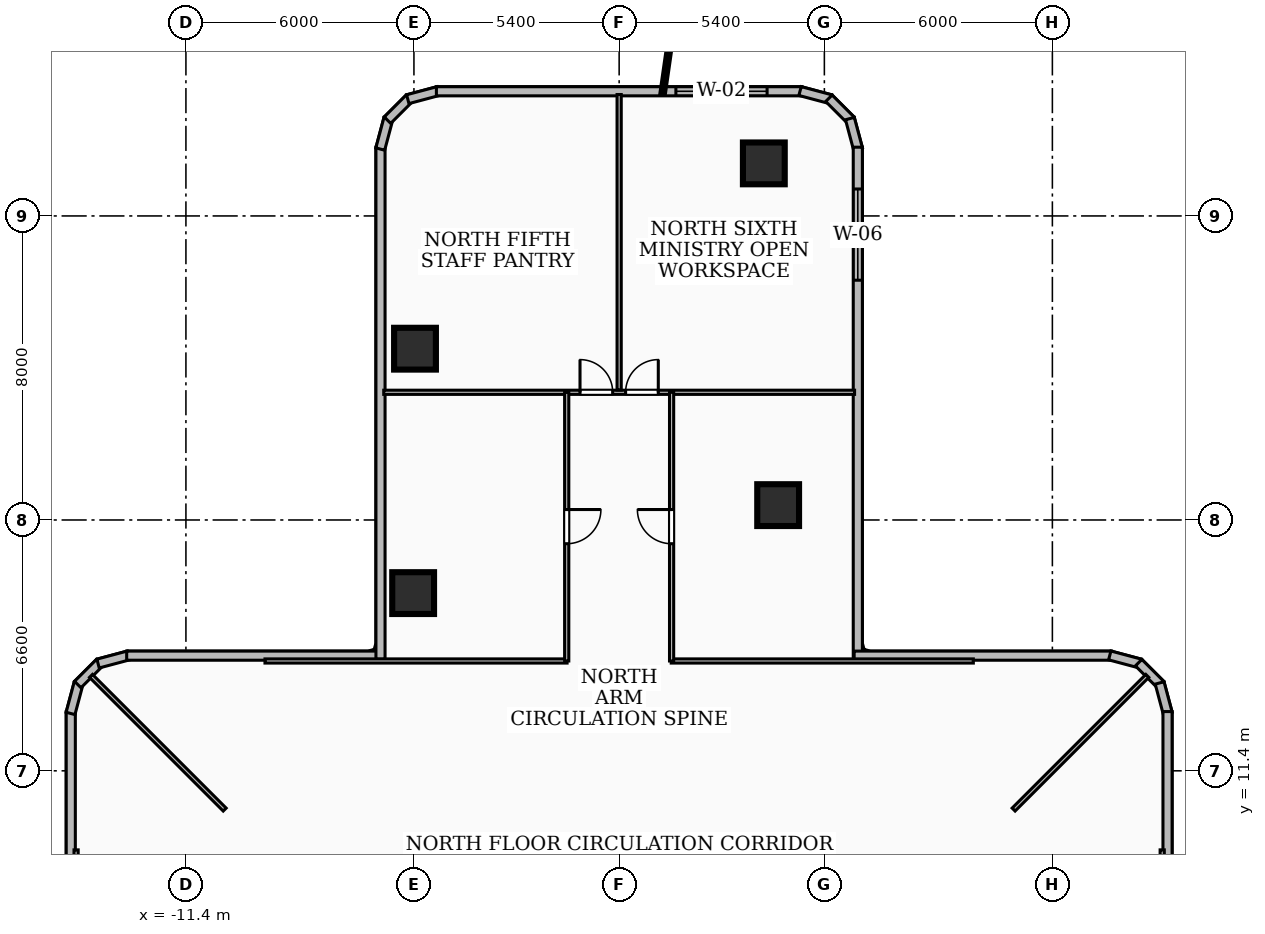
"""IFC4 building model, lengths in metres.
Left out: names, types, materials, properties, quantities, classifications, styles, units other than length and angle.
Written with IfcOpenShell. Run it as: python <this file> out.ifc"""

import sys

from ifc_helpers import new_model, si_unit, direction, frame, frame_2d, origin, origin_2d, place, context, subcontext, project, spatial, rectangle, extrude, element, fill, save


model = new_model("IFC4")
c1 = context("Model", 3, precision=1e-05, world=origin(), true_north=direction((0.0, 1.0)))
c2 = subcontext(c1, "Body", "Model", "MODEL_VIEW")
j1 = project(units=[si_unit("LENGTHUNIT", "METRE"), si_unit("PLANEANGLEUNIT", "RADIAN")], contexts=[c1])
p1 = place(None, origin())
s1 = spatial("IfcSite", under=j1, at=p1, CompositionType="ELEMENT")
p2 = place(p1, origin())
s2 = spatial("IfcBuilding", under=s1, at=p2, CompositionType="ELEMENT")
p3 = place(p2, frame((0.0, 0.0, 28.08)))
s3 = spatial("IfcBuildingStorey", under=s2, at=p3, CompositionType="ELEMENT", Elevation=28.08)
for number, where, z_axis, x_axis in (
    (1, (4.184, 18.391, 0.0), (0.0, 0.0, 1.0), (1.0, 0.0, 0.0)),
    (2, (-5.421, 16.076, 0.0), (0.0, 0.0, 1.0), (1.0, 0.0, 0.0)),
    (3, (3.807, 27.383, 0.0), (0.0, 0.0, 1.0), (1.0, 0.0, 0.0)),
    (4, (-5.372, 22.507, 0.0), (0.0, 0.0, 1.0), (1.0, 0.0, 0.0)),
):
    element("IfcColumn", number, at=place(p3, frame(where, z_axis=z_axis, x_axis=x_axis)), inside=s3, PredefinedType="COLUMN", context=c2, shape_type="SweptSolid", body=[
        extrude(rectangle(XDim=1.1, YDim=1.1, at=origin_2d()), origin(), (0.0, 0.0, 1.0), 3.6),
    ])
p4 = place(p3, frame((-14.43, 6.184, 0.0), z_axis=(0.0, 0.0, 1.0), x_axis=(0.0, 1.0, 0.0)))
e5 = element("IfcWall", 5, at=p4, inside=s3, PredefinedType="SOLIDWALL", context=c2, shape_type="SweptSolid", body=[
    extrude(rectangle(XDim=6.775, YDim=0.24, at=frame_2d((3.387, 0.0))), origin(), (0.0, 0.0, 1.0), 3.34),
])
p5 = place(p3, frame((-14.436, 12.91, 0.0), z_axis=(0.0, 0.0, 1.0), x_axis=(0.257937227116, 0.966161677396, 0.0)))
e6 = element("IfcWall", 6, at=p5, inside=s3, PredefinedType="SOLIDWALL", context=c2, shape_type="SweptSolid", body=[
    extrude(rectangle(XDim=0.83, YDim=0.24, at=frame_2d((0.415, 0.0))), origin(), (0.0, 0.0, 1.0), 3.34),
])
p6 = place(p3, frame((-14.246, 13.67, 0.0), z_axis=(0.0, 0.0, 1.0), x_axis=(0.707106781187, 0.707106781187, 0.0)))
e7 = element("IfcWall", 7, at=p6, inside=s3, PredefinedType="SOLIDWALL", context=c2, shape_type="SweptSolid", body=[
    extrude(rectangle(XDim=0.815, YDim=0.24, at=frame_2d((0.407, 0.0))), origin(), (0.0, 0.0, 1.0), 3.34),
])
p7 = place(p3, frame((-13.712, 14.222, 0.0), z_axis=(0.0, 0.0, 1.0), x_axis=(0.966161677396, 0.257937227116, 0.0)))
e8 = element("IfcWall", 8, at=p7, inside=s3, PredefinedType="SOLIDWALL", context=c2, shape_type="SweptSolid", body=[
    extrude(rectangle(XDim=0.83, YDim=0.24, at=frame_2d((0.415, 0.0))), origin(), (0.0, 0.0, 1.0), 3.34),
])
p8 = place(p3, frame((-12.959, 14.43, 0.0), z_axis=(0.0, 0.0, 1.0), x_axis=(1.0, 0.0, 0.0)))
e9 = element("IfcWall", 9, at=p8, inside=s3, PredefinedType="SOLIDWALL", context=c2, shape_type="SweptSolid", body=[
    extrude(rectangle(XDim=6.775, YDim=0.24, at=frame_2d((3.387, 0.0))), origin(), (0.0, 0.0, 1.0), 2.421),
])
p9 = place(p3, frame((-6.28, 14.334, 0.0), z_axis=(0.0, 0.0, 1.0), x_axis=(0.0, 1.0, 0.0)))
e10 = element("IfcWall", 10, at=p9, inside=s3, PredefinedType="SOLIDWALL", context=c2, shape_type="SweptSolid", body=[
    extrude(rectangle(XDim=13.475, YDim=0.24, at=frame_2d((6.738, 0.0))), origin(), (0.0, 0.0, 1.0), 2.421),
])
p10 = place(p3, frame((-6.286, 27.76, 0.0), z_axis=(0.0, 0.0, 1.0), x_axis=(0.25766265056, 0.966234939601, 0.0)))
e11 = element("IfcWall", 11, at=p10, inside=s3, PredefinedType="SOLIDWALL", context=c2, shape_type="SweptSolid", body=[
    extrude(rectangle(XDim=0.83, YDim=0.24, at=frame_2d((0.415, 0.0))), origin(), (0.0, 0.0, 1.0), 3.34),
])
p11 = place(p3, frame((-6.096, 28.52, 0.0), z_axis=(0.0, 0.0, 1.0), x_axis=(0.707106781187, 0.707106781187, 0.0)))
e12 = element("IfcWall", 12, at=p11, inside=s3, PredefinedType="SOLIDWALL", context=c2, shape_type="SweptSolid", body=[
    extrude(rectangle(XDim=0.814, YDim=0.24, at=frame_2d((0.407, 0.0))), origin(), (0.0, 0.0, 1.0), 3.34),
])
p12 = place(p3, frame((-5.562, 29.072, 0.0), z_axis=(0.0, 0.0, 1.0), x_axis=(0.966234939601, 0.25766265056, 0.0)))
e13 = element("IfcWall", 13, at=p12, inside=s3, PredefinedType="SOLIDWALL", context=c2, shape_type="SweptSolid", body=[
    extrude(rectangle(XDim=0.83, YDim=0.24, at=frame_2d((0.415, 0.0))), origin(), (0.0, 0.0, 1.0), 3.34),
])
p13 = place(p3, frame((-4.809, 29.28, 0.0), z_axis=(0.0, 0.0, 1.0), x_axis=(1.0, 0.0, 0.0)))
e14 = element("IfcWall", 14, at=p13, inside=s3, PredefinedType="SOLIDWALL", context=c2, shape_type="SweptSolid", body=[
    extrude(rectangle(XDim=9.618, YDim=0.24, at=frame_2d((4.809, 0.0))), origin(), (0.0, 0.0, 1.0), 3.34),
])
p14 = place(p13, frame((6.302, 0.0, 0.85)))
e15 = element("IfcOpeningElement", 15, at=p14, cuts=e14, PredefinedType="OPENING", context=c2, shape_type="SweptSolid", body=[
    extrude(rectangle(XDim=2.4, YDim=2.1, at=frame_2d((1.2, 1.05))), frame((0.0, 0.13, 0.0), z_axis=(0.0, -1.0, 0.0), x_axis=(1.0, 0.0, 0.0)), (0.0, 0.0, 1.0), 0.26),
])
p15 = place(p3, frame((4.76, 29.286, 0.0), z_axis=(0.0, 0.0, 1.0), x_axis=(0.966234939601, -0.25766265056, 0.0)))
e16 = element("IfcWall", 16, at=p15, inside=s3, PredefinedType="SOLIDWALL", context=c2, shape_type="SweptSolid", body=[
    extrude(rectangle(XDim=0.83, YDim=0.24, at=frame_2d((0.415, 0.0))), origin(), (0.0, 0.0, 1.0), 3.34),
])
p16 = place(p3, frame((5.52, 29.096, 0.0), z_axis=(0.0, 0.0, 1.0), x_axis=(0.707106781187, -0.707106781187, 0.0)))
e17 = element("IfcWall", 17, at=p16, inside=s3, PredefinedType="SOLIDWALL", context=c2, shape_type="SweptSolid", body=[
    extrude(rectangle(XDim=0.814, YDim=0.24, at=frame_2d((0.407, 0.0))), origin(), (0.0, 0.0, 1.0), 3.34),
])
p17 = place(p3, frame((6.072, 28.562, 0.0), z_axis=(0.0, 0.0, 1.0), x_axis=(0.25766265056, -0.966234939601, 0.0)))
e18 = element("IfcWall", 18, at=p17, inside=s3, PredefinedType="SOLIDWALL", context=c2, shape_type="SweptSolid", body=[
    extrude(rectangle(XDim=0.83, YDim=0.24, at=frame_2d((0.415, 0.0))), origin(), (0.0, 0.0, 1.0), 3.34),
])
p18 = place(p3, frame((6.28, 27.809, 0.0), z_axis=(0.0, 0.0, 1.0), x_axis=(0.0, -1.0, 0.0)))
e19 = element("IfcWall", 19, at=p18, inside=s3, PredefinedType="SOLIDWALL", context=c2, shape_type="SweptSolid", body=[
    extrude(rectangle(XDim=13.475, YDim=0.24, at=frame_2d((6.738, 0.0))), origin(), (0.0, 0.0, 1.0), 3.34),
])
p19 = place(p18, frame((1.1, 0.0, 0.85)))
e20 = element("IfcOpeningElement", 20, at=p19, cuts=e19, PredefinedType="OPENING", context=c2, shape_type="SweptSolid", body=[
    extrude(rectangle(XDim=2.4, YDim=1.85, at=frame_2d((1.2, 0.925))), frame((0.0, 0.13, 0.0), z_axis=(0.0, -1.0, 0.0), x_axis=(1.0, 0.0, 0.0)), (0.0, 0.0, 1.0), 0.26),
])
p20 = place(p3, frame((6.184, 14.43, 0.0), z_axis=(0.0, 0.0, 1.0), x_axis=(1.0, 0.0, 0.0)))
e21 = element("IfcWall", 21, at=p20, inside=s3, PredefinedType="SOLIDWALL", context=c2, shape_type="SweptSolid", body=[
    extrude(rectangle(XDim=6.775, YDim=0.24, at=frame_2d((3.387, 0.0))), origin(), (0.0, 0.0, 1.0), 3.34),
])
p21 = place(p3, frame((12.91, 14.436, 0.0), z_axis=(0.0, 0.0, 1.0), x_axis=(0.966161677396, -0.257937227116, 0.0)))
e22 = element("IfcWall", 22, at=p21, inside=s3, PredefinedType="SOLIDWALL", context=c2, shape_type="SweptSolid", body=[
    extrude(rectangle(XDim=0.83, YDim=0.24, at=frame_2d((0.415, 0.0))), origin(), (0.0, 0.0, 1.0), 3.34),
])
p22 = place(p3, frame((13.67, 14.246, 0.0), z_axis=(0.0, 0.0, 1.0), x_axis=(0.707106781187, -0.707106781187, 0.0)))
e23 = element("IfcWall", 23, at=p22, inside=s3, PredefinedType="SOLIDWALL", context=c2, shape_type="SweptSolid", body=[
    extrude(rectangle(XDim=0.815, YDim=0.24, at=frame_2d((0.407, 0.0))), origin(), (0.0, 0.0, 1.0), 3.34),
])
p23 = place(p3, frame((14.222, 13.712, 0.0), z_axis=(0.0, 0.0, 1.0), x_axis=(0.257937227116, -0.966161677396, 0.0)))
e24 = element("IfcWall", 24, at=p23, inside=s3, PredefinedType="SOLIDWALL", context=c2, shape_type="SweptSolid", body=[
    extrude(rectangle(XDim=0.83, YDim=0.24, at=frame_2d((0.415, 0.0))), origin(), (0.0, 0.0, 1.0), 3.34),
])
p24 = place(p3, frame((14.43, 12.959, 0.0), z_axis=(0.0, 0.0, 1.0), x_axis=(0.0, -1.0, 0.0)))
e25 = element("IfcWall", 25, at=p24, inside=s3, PredefinedType="SOLIDWALL", context=c2, shape_type="SweptSolid", body=[
    extrude(rectangle(XDim=6.775, YDim=0.24, at=frame_2d((3.387, 0.0))), origin(), (0.0, 0.0, 1.0), 3.34),
])
for number, where, z_axis, x_axis in (
    (26, (10.38, 10.38, 0.0), (0.0, 0.0, 1.0), (0.707, 0.707, 0.0)),
    (27, (-10.38, 10.38, 0.0), (0.0, 0.0, 1.0), (-0.707, 0.707, 0.0)),
):
    element("IfcWall", number, at=place(p3, frame(where, z_axis=z_axis, x_axis=x_axis)), inside=s3, PredefinedType="PARTITIONING", context=c2, shape_type="SweptSolid", body=[
        extrude(rectangle(XDim=4.975, YDim=0.11, at=frame_2d((2.488, 0.0))), origin(), (0.0, 0.0, 1.0), 3.34),
    ])
for number, where, z_axis, x_axis in (
    (28, (14.29, 1.37, 0.0), (0.0, 0.0, 1.0), (0.0, 1.0, 0.0)),
    (29, (-1.37, 14.29, 0.0), (0.0, 0.0, 1.0), (-1.0, 0.0, 0.0)),
    (30, (9.32, 14.29, 0.0), (0.0, 0.0, 1.0), (-1.0, 0.0, 0.0)),
):
    element("IfcWall", number, at=place(p3, frame(where, z_axis=z_axis, x_axis=x_axis)), inside=s3, PredefinedType="PARTITIONING", context=c2, shape_type="SweptSolid", body=[
        extrude(rectangle(XDim=7.95, YDim=0.11, at=frame_2d((3.975, 0.0))), origin(), (0.0, 0.0, 1.0), 2.421),
    ])
p25 = place(p3, frame((-1.38, 21.36, 0.0), z_axis=(0.0, 0.0, 1.0), x_axis=(0.0, -1.0, 0.0)))
e31 = element("IfcWall", 31, at=p25, inside=s3, PredefinedType="PARTITIONING", context=c2, shape_type="SweptSolid", body=[
    extrude(rectangle(XDim=7.07, YDim=0.11, at=frame_2d((3.535, 0.0))), origin(), (0.0, 0.0, 1.0), 2.869),
])
p26 = place(p25, frame((3.085, 0.0, 0.0)))
e32 = element("IfcOpeningElement", 32, at=p26, cuts=e31, PredefinedType="OPENING", context=c2, shape_type="SweptSolid", body=[
    extrude(rectangle(XDim=0.9, YDim=2.06, at=frame_2d((0.45, 1.03))), frame((0.0, 0.065, 0.0), z_axis=(0.0, -1.0, 0.0), x_axis=(1.0, 0.0, 0.0)), (0.0, 0.0, 1.0), 0.13),
])
p27 = place(p3, frame((1.38, 14.29, 0.0), z_axis=(0.0, 0.0, 1.0), x_axis=(0.0, 1.0, 0.0)))
e33 = element("IfcWall", 33, at=p27, inside=s3, PredefinedType="PARTITIONING", context=c2, shape_type="SweptSolid", body=[
    extrude(rectangle(XDim=7.07, YDim=0.11, at=frame_2d((3.535, 0.0))), origin(), (0.0, 0.0, 1.0), 2.869),
])
p28 = place(p27, frame((3.085, 0.0, 0.0)))
e34 = element("IfcOpeningElement", 34, at=p28, cuts=e33, PredefinedType="OPENING", context=c2, shape_type="SweptSolid", body=[
    extrude(rectangle(XDim=0.9, YDim=2.06, at=frame_2d((0.45, 1.03))), frame((0.0, 0.065, 0.0), z_axis=(0.0, -1.0, 0.0), x_axis=(1.0, 0.0, 0.0)), (0.0, 0.0, 1.0), 0.13),
])
p29 = place(p3, frame((0.0, 21.42, 0.0), z_axis=(0.0, 0.0, 1.0), x_axis=(0.0, 1.0, 0.0)))
e35 = element("IfcWall", 35, at=p29, inside=s3, PredefinedType="PARTITIONING", context=c2, shape_type="SweptSolid", body=[
    extrude(rectangle(XDim=7.775, YDim=0.11, at=frame_2d((3.888, 0.0))), origin(), (0.0, 0.0, 1.0), 2.72),
])
p30 = place(p3, frame((-6.195, 21.36, 0.0), z_axis=(0.0, 0.0, 1.0), x_axis=(1.0, 0.0, 0.0)))
e36 = element("IfcWall", 36, at=p30, inside=s3, PredefinedType="PARTITIONING", context=c2, shape_type="SweptSolid", body=[
    extrude(rectangle(XDim=12.39, YDim=0.11, at=frame_2d((6.195, 0.0))), origin(), (0.0, 0.0, 1.0), 2.421),
])
p31 = place(p30, frame((6.365, 0.0, 0.0)))
e37 = element("IfcOpeningElement", 37, at=p31, cuts=e36, PredefinedType="OPENING", context=c2, shape_type="SweptSolid", body=[
    extrude(rectangle(XDim=0.86, YDim=2.04, at=frame_2d((0.43, 1.02))), frame((0.0, 0.065, 0.0), z_axis=(0.0, -1.0, 0.0), x_axis=(1.0, 0.0, 0.0)), (0.0, 0.0, 1.0), 0.13),
])
p32 = place(p30, frame((5.165, 0.0, 0.0)))
e38 = element("IfcOpeningElement", 38, at=p32, cuts=e36, PredefinedType="OPENING", context=c2, shape_type="SweptSolid", body=[
    extrude(rectangle(XDim=0.86, YDim=2.04, at=frame_2d((0.43, 1.02))), frame((0.0, 0.065, 0.0), z_axis=(0.0, -1.0, 0.0), x_axis=(1.0, 0.0, 0.0)), (0.0, 0.0, 1.0), 0.13),
])
p33 = place(p3, frame((-14.29, 9.32, 0.0), z_axis=(0.0, 0.0, 1.0), x_axis=(0.0, -1.0, 0.0)))
e39 = element("IfcWall", 39, at=p33, inside=s3, PredefinedType="PARTITIONING", context=c2, shape_type="SweptSolid", body=[
    extrude(rectangle(XDim=7.95, YDim=0.11, at=frame_2d((3.975, 0.0))), origin(), (0.0, 0.0, 1.0), 2.421),
])
p34 = place(p14, origin())
e40 = element("IfcWindow", 40, at=p34, inside=s3, PartitioningType="SINGLE_PANEL", PredefinedType="WINDOW", context=c2, shape_type="SweptSolid", body=[
    extrude(rectangle(XDim=2.4, YDim=2.1, at=frame_2d((1.2, 1.05))), frame((0.0, 0.03, 0.0), z_axis=(0.0, -1.0, 0.0), x_axis=(1.0, 0.0, 0.0)), (0.0, 0.0, 1.0), 0.06),
])
fill(e15, e40)
p35 = place(p19, origin())
e41 = element("IfcWindow", 41, at=p35, inside=s3, PartitioningType="SINGLE_PANEL", PredefinedType="WINDOW", context=c2, shape_type="SweptSolid", body=[
    extrude(rectangle(XDim=2.4, YDim=1.85, at=frame_2d((1.2, 0.925))), frame((0.0, 0.03, 0.0), z_axis=(0.0, -1.0, 0.0), x_axis=(1.0, 0.0, 0.0)), (0.0, 0.0, 1.0), 0.06),
])
fill(e20, e41)
p36 = place(p26, origin())
e42 = element("IfcDoor", 42, at=p36, inside=s3, OperationType="SINGLE_SWING_LEFT", PredefinedType="DOOR", context=c2, shape_type="SweptSolid", body=[
    extrude(rectangle(XDim=0.9, YDim=2.06, at=frame_2d((0.45, 1.03))), frame((0.0, 0.025, 0.0), z_axis=(0.0, -1.0, 0.0), x_axis=(1.0, 0.0, 0.0)), (0.0, 0.0, 1.0), 0.05),
])
fill(e32, e42)
p37 = place(p28, origin())
e43 = element("IfcDoor", 43, at=p37, inside=s3, OperationType="SINGLE_SWING_RIGHT", PredefinedType="DOOR", context=c2, shape_type="SweptSolid", body=[
    extrude(rectangle(XDim=0.9, YDim=2.06, at=frame_2d((0.45, 1.03))), frame((0.0, 0.025, 0.0), z_axis=(0.0, -1.0, 0.0), x_axis=(1.0, 0.0, 0.0)), (0.0, 0.0, 1.0), 0.05),
])
fill(e34, e43)
p38 = place(p31, origin())
e44 = element("IfcDoor", 44, at=p38, inside=s3, OperationType="SINGLE_SWING_RIGHT", PredefinedType="DOOR", context=c2, shape_type="SweptSolid", body=[
    extrude(rectangle(XDim=0.86, YDim=2.04, at=frame_2d((0.43, 1.02))), frame((0.0, 0.025, 0.0), z_axis=(0.0, -1.0, 0.0), x_axis=(1.0, 0.0, 0.0)), (0.0, 0.0, 1.0), 0.05),
])
fill(e37, e44)
p39 = place(p32, origin())
e45 = element("IfcDoor", 45, at=p39, inside=s3, OperationType="SINGLE_SWING_LEFT", PredefinedType="DOOR", context=c2, shape_type="SweptSolid", body=[
    extrude(rectangle(XDim=0.86, YDim=2.04, at=frame_2d((0.43, 1.02))), frame((0.0, 0.025, 0.0), z_axis=(0.0, -1.0, 0.0), x_axis=(1.0, 0.0, 0.0)), (0.0, 0.0, 1.0), 0.05),
])
fill(e38, e45)
save(model, sys.argv[1])
